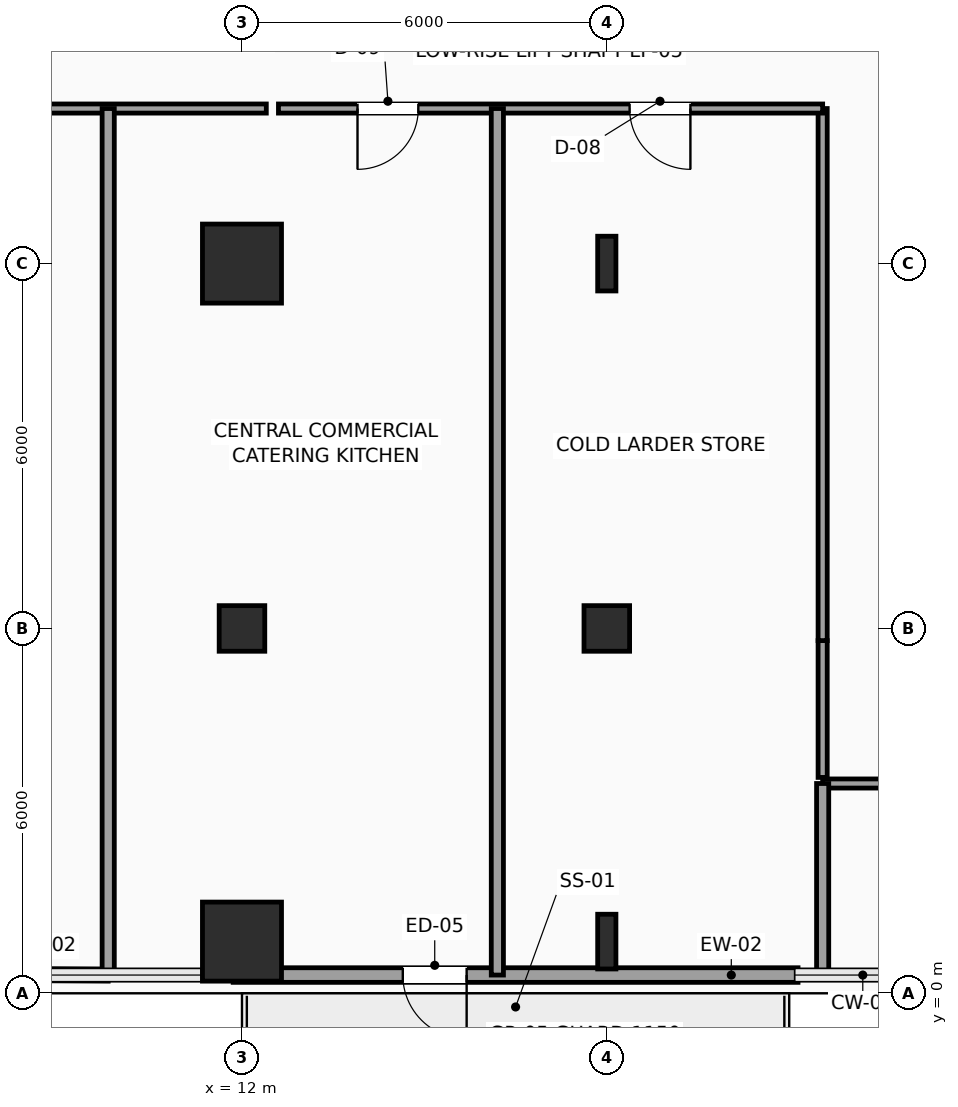
"""IFC4 building model, lengths in metres.
Left out: names, types, materials, properties, quantities, classifications, styles, units other than length and angle.
Written with IfcOpenShell. Run it as: python <this file> out.ifc"""

import sys

from ifc_helpers import new_model, si_unit, direction, frame, frame_2d, origin, origin_2d, place, context, subcontext, project, spatial, rectangle, hollow_rectangle, i_section, extrude, element, fill, save


model = new_model("IFC4")
c1 = context("Model", 3, precision=1e-05, world=origin(), true_north=direction((0.0, 1.0)))
c2 = subcontext(c1, "Body", "Model", "MODEL_VIEW")
j1 = project(units=[si_unit("LENGTHUNIT", "METRE"), si_unit("PLANEANGLEUNIT", "RADIAN")], contexts=[c1])
p1 = place(None, origin())
s1 = spatial("IfcSite", under=j1, at=p1, CompositionType="ELEMENT")
p2 = place(p1, origin())
s2 = spatial("IfcBuilding", under=s1, at=p2, CompositionType="ELEMENT")
p3 = place(p2, frame((0.0, 0.0, 67.5)))
s3 = spatial("IfcBuildingStorey", under=s2, at=p3, CompositionType="ELEMENT", Elevation=67.5)
p4 = place(p3, frame((12.0, 0.85, 0.0), z_axis=(0.0, 0.0, 1.0), x_axis=(1.0, 0.0, 0.0)))
e1 = element("IfcColumn", 1, at=p4, inside=s3, PredefinedType="COLUMN", context=c2, shape_type="SweptSolid", body=[
    extrude(rectangle(XDim=1.3, YDim=1.3, at=origin_2d()), origin(), (0.0, 0.0, 1.0), 3.9),
])
p5 = place(p3, frame((12.0, 6.0, 0.0), z_axis=(0.0, 0.0, 1.0), x_axis=(1.0, 0.0, 0.0)))
e2 = element("IfcColumn", 2, at=p5, inside=s3, PredefinedType="COLUMN", context=c2, shape_type="SweptSolid", body=[
    extrude(hollow_rectangle(XDim=0.75, YDim=0.75, WallThickness=0.035, InnerFilletRadius=0.035, OuterFilletRadius=0.05, at=origin_2d()), origin(), (0.0, 0.0, 1.0), 3.9),
])
p6 = place(p3, frame((12.0, 12.0, 0.0), z_axis=(0.0, 0.0, 1.0), x_axis=(1.0, 0.0, 0.0)))
e3 = element("IfcColumn", 3, at=p6, inside=s3, PredefinedType="COLUMN", context=c2, shape_type="SweptSolid", body=[
    extrude(rectangle(XDim=1.3, YDim=1.3, at=origin_2d()), origin(), (0.0, 0.0, 1.0), 3.9),
])
p7 = place(p3, frame((18.0, 0.85, 0.0), z_axis=(0.0, 0.0, 1.0), x_axis=(1.0, 0.0, 0.0)))
e4 = element("IfcColumn", 4, at=p7, inside=s3, PredefinedType="COLUMN", context=c2, shape_type="SweptSolid", body=[
    extrude(i_section(OverallWidth=0.3, OverallDepth=0.9, WebThickness=0.019, FlangeThickness=0.035, FilletRadius=0.03, at=origin_2d()), origin(), (0.0, 0.0, 1.0), 3.9),
])
p8 = place(p3, frame((18.0, 6.0, 0.0), z_axis=(0.0, 0.0, 1.0), x_axis=(1.0, 0.0, 0.0)))
e5 = element("IfcColumn", 5, at=p8, inside=s3, PredefinedType="COLUMN", context=c2, shape_type="SweptSolid", body=[
    extrude(hollow_rectangle(XDim=0.75, YDim=0.75, WallThickness=0.035, InnerFilletRadius=0.035, OuterFilletRadius=0.05, at=origin_2d()), origin(), (0.0, 0.0, 1.0), 3.9),
])
p9 = place(p3, frame((18.0, 12.0, 0.0), z_axis=(0.0, 0.0, 1.0), x_axis=(1.0, 0.0, 0.0)))
e6 = element("IfcColumn", 6, at=p9, inside=s3, PredefinedType="COLUMN", context=c2, shape_type="SweptSolid", body=[
    extrude(i_section(OverallWidth=0.3, OverallDepth=0.9, WebThickness=0.019, FlangeThickness=0.035, FilletRadius=0.03, at=origin_2d()), origin(), (0.0, 0.0, 1.0), 3.9),
])
p10 = place(p3, frame((21.145, 0.3, 0.0), z_axis=(0.0, 0.0, 1.0), x_axis=(-1.0, 0.0, 0.0)))
e7 = element("IfcWall", 7, at=p10, inside=s3, PredefinedType="SOLIDWALL", context=c2, shape_type="SweptSolid", body=[
    extrude(rectangle(XDim=9.29, YDim=0.24, at=frame_2d((4.645, 0.0))), origin(), (0.0, 0.0, 1.0), 3.65),
])
p11 = place(p10, frame((5.45, 0.0, 0.0)))
e8 = element("IfcOpeningElement", 8, at=p11, cuts=e7, PredefinedType="OPENING", context=c2, shape_type="SweptSolid", body=[
    extrude(rectangle(XDim=1.05, YDim=2.2, at=frame_2d((0.525, 1.1))), frame((0.0, 0.13, 0.0), z_axis=(0.0, -1.0, 0.0), x_axis=(1.0, 0.0, 0.0)), (0.0, 0.0, 1.0), 0.26),
])
p12 = place(p3, frame((36.15, 3.45, 0.0), z_axis=(0.0, 0.0, 1.0), x_axis=(-1.0, 0.0, 0.0)))
e9 = element("IfcWall", 9, at=p12, inside=s3, PredefinedType="PARTITIONING", context=c2, shape_type="SweptSolid", body=[
    extrude(rectangle(XDim=14.6, YDim=0.15, at=frame_2d((7.3, 0.0))), origin(), (0.0, 0.0, 1.0), 3.142),
])
p13 = place(p12, frame((11.275, 0.0, 0.0)))
e10 = element("IfcOpeningElement", 10, at=p13, cuts=e9, PredefinedType="OPENING", context=c2, shape_type="SweptSolid", body=[
    extrude(rectangle(XDim=1.0, YDim=2.2, at=frame_2d((0.5, 1.1))), frame((0.0, 0.085, 0.0), z_axis=(0.0, -1.0, 0.0), x_axis=(1.0, 0.0, 0.0)), (0.0, 0.0, 1.0), 0.17),
])
p14 = place(p12, frame((5.65, 0.0, 0.0)))
e11 = element("IfcOpeningElement", 11, at=p14, cuts=e9, PredefinedType="OPENING", context=c2, shape_type="SweptSolid", body=[
    extrude(rectangle(XDim=1.0, YDim=2.2, at=frame_2d((0.5, 1.1))), frame((0.0, 0.085, 0.0), z_axis=(0.0, -1.0, 0.0), x_axis=(1.0, 0.0, 0.0)), (0.0, 0.0, 1.0), 0.17),
])
p15 = place(p3, frame((21.55, 3.55, 0.0), z_axis=(0.0, 0.0, 1.0), x_axis=(0.0, 1.0, 0.0)))
e12 = element("IfcWall", 12, at=p15, inside=s3, PredefinedType="PARTITIONING", context=c2, shape_type="SweptSolid", body=[
    extrude(rectangle(XDim=2.25, YDim=0.15, at=frame_2d((1.125, 0.0))), origin(), (0.0, 0.0, 1.0), 3.65),
])
p16 = place(p3, frame((21.55, 5.8, 0.0), z_axis=(0.0, 0.0, 1.0), x_axis=(0.0, 1.0, 0.0)))
e13 = element("IfcWall", 13, at=p16, inside=s3, PredefinedType="PARTITIONING", context=c2, shape_type="SweptSolid", body=[
    extrude(rectangle(XDim=8.75, YDim=0.15, at=frame_2d((4.375, 0.0))), origin(), (0.0, 0.0, 1.0), 3.65),
])
p17 = place(p3, frame((21.55, 14.55, 0.0), z_axis=(0.0, 0.0, 1.0), x_axis=(-1.0, 0.0, 0.0)))
e14 = element("IfcWall", 14, at=p17, inside=s3, PredefinedType="PARTITIONING", context=c2, shape_type="SweptSolid", body=[
    extrude(rectangle(XDim=8.95, YDim=0.15, at=frame_2d((4.475, 0.0))), origin(), (0.0, 0.0, 1.0), 3.65),
])
p18 = place(p17, frame((6.65, 0.0, 0.0)))
e15 = element("IfcOpeningElement", 15, at=p18, cuts=e14, PredefinedType="OPENING", context=c2, shape_type="SweptSolid", body=[
    extrude(rectangle(XDim=1.0, YDim=2.2, at=frame_2d((0.5, 1.1))), frame((0.0, 0.085, 0.0), z_axis=(0.0, -1.0, 0.0), x_axis=(1.0, 0.0, 0.0)), (0.0, 0.0, 1.0), 0.17),
])
p19 = place(p17, frame((2.175, 0.0, 0.0)))
e16 = element("IfcOpeningElement", 16, at=p19, cuts=e14, PredefinedType="OPENING", context=c2, shape_type="SweptSolid", body=[
    extrude(rectangle(XDim=1.0, YDim=2.2, at=frame_2d((0.5, 1.1))), frame((0.0, 0.085, 0.0), z_axis=(0.0, -1.0, 0.0), x_axis=(1.0, 0.0, 0.0)), (0.0, 0.0, 1.0), 0.17),
])
p20 = place(p3, frame((12.4, 14.55, 0.0), z_axis=(0.0, 0.0, 1.0), x_axis=(-1.0, 0.0, 0.0)))
e17 = element("IfcWall", 17, at=p20, inside=s3, PredefinedType="PARTITIONING", context=c2, shape_type="SweptSolid", body=[
    extrude(rectangle(XDim=7.15, YDim=0.15, at=frame_2d((3.575, 0.0))), origin(), (0.0, 0.0, 1.0), 3.65),
])
p21 = place(p20, frame((4.375, 0.0, 0.0)))
e18 = element("IfcOpeningElement", 18, at=p21, cuts=e17, PredefinedType="OPENING", context=c2, shape_type="SweptSolid", body=[
    extrude(rectangle(XDim=1.0, YDim=2.2, at=frame_2d((0.5, 1.1))), frame((0.0, 0.085, 0.0), z_axis=(0.0, -1.0, 0.0), x_axis=(1.0, 0.0, 0.0)), (0.0, 0.0, 1.0), 0.17),
])
p22 = place(p3, frame((6.215, 0.319, 0.0), z_axis=(0.0, 0.0, 1.0), x_axis=(0.999985892136, -0.005311829174, 0.0)))
e19 = element("IfcWall", 19, at=p22, inside=s3, PredefinedType="PARTITIONING", context=c2, shape_type="SweptSolid", body=[
    extrude(rectangle(XDim=3.585, YDim=0.2, at=frame_2d((1.792, 0.0))), origin(), (0.0, 0.0, 1.0), 3.65),
])
for number, where, z_axis, x_axis in (
    (20, (9.8, 0.3, 0.0), (0.0, 0.0, 1.0), (0.0, 1.0, 0.0)),
    (21, (16.2, 0.3, 0.0), (0.0, 0.0, 1.0), (0.0, 1.0, 0.0)),
):
    element("IfcWall", number, at=place(p3, frame(where, z_axis=z_axis, x_axis=x_axis)), inside=s3, PredefinedType="PARTITIONING", context=c2, shape_type="SweptSolid", body=[
        extrude(rectangle(XDim=14.25, YDim=0.2, at=frame_2d((7.125, 0.0))), origin(), (0.0, 0.0, 1.0), 3.65),
    ])
p23 = place(p3, frame((21.55, 0.3, 0.0), z_axis=(0.0, 0.0, 1.0), x_axis=(0.0, 1.0, 0.0)))
e22 = element("IfcWall", 22, at=p23, inside=s3, PredefinedType="PARTITIONING", context=c2, shape_type="SweptSolid", body=[
    extrude(rectangle(XDim=3.15, YDim=0.2, at=frame_2d((1.575, 0.0))), origin(), (0.0, 0.0, 1.0), 3.65),
])
p24 = place(p11, origin())
e23 = element("IfcDoor", 23, at=p24, inside=s3, OperationType="SINGLE_SWING_LEFT", PredefinedType="DOOR", context=c2, shape_type="SweptSolid", body=[
    extrude(rectangle(XDim=1.05, YDim=2.2, at=frame_2d((0.525, 1.1))), frame((0.0, 0.025, 0.0), z_axis=(0.0, -1.0, 0.0), x_axis=(1.0, 0.0, 0.0)), (0.0, 0.0, 1.0), 0.05),
])
fill(e8, e23)
p25 = place(p18, origin())
e24 = element("IfcDoor", 24, at=p25, inside=s3, OperationType="SINGLE_SWING_RIGHT", PredefinedType="DOOR", context=c2, shape_type="SweptSolid", body=[
    extrude(rectangle(XDim=1.0, YDim=2.2, at=frame_2d((0.5, 1.1))), frame((0.0, 0.025, 0.0), z_axis=(0.0, -1.0, 0.0), x_axis=(1.0, 0.0, 0.0)), (0.0, 0.0, 1.0), 0.05),
])
fill(e15, e24)
p26 = place(p19, origin())
e25 = element("IfcDoor", 25, at=p26, inside=s3, OperationType="SINGLE_SWING_LEFT", PredefinedType="DOOR", context=c2, shape_type="SweptSolid", body=[
    extrude(rectangle(XDim=1.0, YDim=2.2, at=frame_2d((0.5, 1.1))), frame((0.0, 0.025, 0.0), z_axis=(0.0, -1.0, 0.0), x_axis=(1.0, 0.0, 0.0)), (0.0, 0.0, 1.0), 0.05),
])
fill(e16, e25)
save(model, sys.argv[1])
